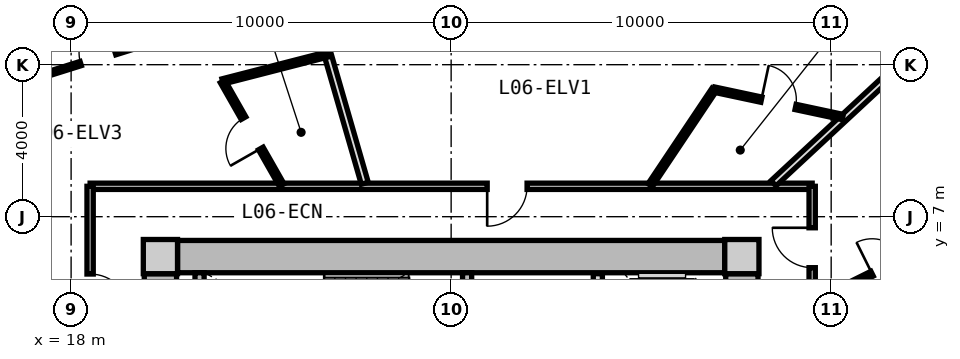
"""IFC4 building model, lengths in metres.
Left out: names, types, materials, properties, quantities, classifications, styles, units other than length and angle.
Written with IfcOpenShell. Run it as: python <this file> out.ifc"""

import sys

from ifc_helpers import new_model, si_unit, direction, frame, frame_2d, origin, origin_2d, place, context, subcontext, project, spatial, rectangle, extrude, source, transform, mapped, element, fill, save


model = new_model("IFC4")
c1 = context("Model", 3, precision=1e-05, world=origin(), true_north=direction((0.0, 1.0)))
c2 = subcontext(c1, "Body", "Model", "MODEL_VIEW")
j1 = project(units=[si_unit("LENGTHUNIT", "METRE"), si_unit("PLANEANGLEUNIT", "RADIAN")], contexts=[c1])
p1 = place(None, origin())
s1 = spatial("IfcSite", under=j1, at=p1, CompositionType="ELEMENT")
p2 = place(p1, origin())
s2 = spatial("IfcBuilding", under=s1, at=p2, CompositionType="ELEMENT")
p3 = place(p2, frame((0.0, 0.0, 24.65)))
s3 = spatial("IfcBuildingStorey", under=s2, at=p3, CompositionType="ELEMENT", Elevation=24.65)
m1 = source(origin(), c2, "Body", "SweptSolid", [
    extrude(rectangle(XDim=0.9, YDim=0.9, at=origin_2d()), origin(), (0.0, 0.0, 1.0), 3.05),
])
for number, where, z_axis, x_axis in (
    (1, (35.65, 5.95, 0.0), (0.0, 0.0, 1.0), (1.0, 0.0, 0.0)),
    (2, (20.35, 5.95, 0.0), (0.0, 0.0, 1.0), (1.0, 0.0, 0.0)),
):
    element("IfcColumn", number, at=place(p3, frame(where, z_axis=z_axis, x_axis=x_axis)), inside=s3, PredefinedType="COLUMN", context=c2, shape_type="MappedRepresentation", body=[
        mapped(m1, transform((0.0, 0.0, 0.0), x_axis=(1.0, 0.0, 0.0), y_axis=(0.0, 1.0, 0.0), z_axis=(0.0, 0.0, 1.0), scale=1.0)),
    ])
m2 = source(origin(), c2, "Body", "SweptSolid", [
    extrude(rectangle(XDim=14.4, YDim=0.85, at=frame_2d((7.2, 0.0))), origin(), (0.0, 0.0, 1.0), 2.79),
])
p4 = place(p3, frame((20.8, 5.95, 0.0), z_axis=(0.0, 0.0, 1.0), x_axis=(1.0, 0.0, 0.0)))
e3 = element("IfcWall", 3, at=p4, inside=s3, PredefinedType="SHEAR", context=c2, shape_type="MappedRepresentation", body=[
    mapped(m2, transform((0.0, 0.0, 0.0), x_axis=(1.0, 0.0, 0.0), y_axis=(0.0, 1.0, 0.0), z_axis=(0.0, 0.0, 1.0), scale=1.0)),
])
m3 = source(origin(), c2, "Body", "SweptSolid", [
    extrude(rectangle(XDim=11.0, YDim=0.85, at=frame_2d((5.5, 0.0))), origin(), (0.0, 0.0, 1.0), 2.79),
])
p5 = place(p3, frame((20.35, -5.5, 0.0), z_axis=(0.0, 0.0, 1.0), x_axis=(0.0, 1.0, 0.0)))
e4 = element("IfcWall", 4, at=p5, inside=s3, PredefinedType="SHEAR", context=c2, shape_type="MappedRepresentation", body=[
    mapped(m3, transform((0.0, 0.0, 0.0), x_axis=(1.0, 0.0, 0.0), y_axis=(0.0, 1.0, 0.0), z_axis=(0.0, 0.0, 1.0), scale=1.0)),
])
p6 = place(p5, frame((3.8, 0.0, 0.0)))
e5 = element("IfcOpeningElement", 5, at=p6, cuts=e4, PredefinedType="OPENING", context=c2, shape_type="SweptSolid", body=[
    extrude(rectangle(XDim=1.2, YDim=2.15, at=frame_2d((0.6, 1.075))), frame((0.0, 0.435, 0.0), z_axis=(0.0, -1.0, 0.0), x_axis=(1.0, 0.0, 0.0)), (0.0, 0.0, 1.0), 0.87),
])
p7 = place(p3, frame((35.65, 5.5, 0.0), z_axis=(0.0, 0.0, 1.0), x_axis=(0.0, -1.0, 0.0)))
e6 = element("IfcWall", 6, at=p7, inside=s3, PredefinedType="SHEAR", context=c2, shape_type="MappedRepresentation", body=[
    mapped(m3, transform((0.0, 0.0, 0.0), x_axis=(1.0, 0.0, 0.0), y_axis=(0.0, 1.0, 0.0), z_axis=(0.0, 0.0, 1.0), scale=1.0)),
])
p8 = place(p7, frame((5.65, 0.0, 0.0)))
e7 = element("IfcOpeningElement", 7, at=p8, cuts=e6, PredefinedType="OPENING", context=c2, shape_type="SweptSolid", body=[
    extrude(rectangle(XDim=1.2, YDim=2.15, at=frame_2d((0.6, 1.075))), frame((0.0, 0.435, 0.0), z_axis=(0.0, -1.0, 0.0), x_axis=(1.0, 0.0, 0.0)), (0.0, 0.0, 1.0), 0.87),
])
m4 = source(origin(), c2, "Body", "SweptSolid", [
    extrude(rectangle(XDim=3.075, YDim=0.24, at=frame_2d((1.538, 0.0))), origin(), (0.0, 0.0, 1.0), 2.79),
])
p9 = place(p3, frame((21.38, 2.45, 0.0), z_axis=(0.0, 0.0, 1.0), x_axis=(0.0, 1.0, 0.0)))
e8 = element("IfcWall", 8, at=p9, inside=s3, PredefinedType="PARTITIONING", context=c2, shape_type="MappedRepresentation", body=[
    mapped(m4, transform((0.0, 0.0, 0.0), x_axis=(1.0, 0.0, 0.0), y_axis=(0.0, 1.0, 0.0), z_axis=(0.0, 0.0, 1.0), scale=1.0)),
])
p10 = place(p3, frame((28.42, 2.45, 0.0), z_axis=(0.0, 0.0, 1.0), x_axis=(0.0, 1.0, 0.0)))
e9 = element("IfcWall", 9, at=p10, inside=s3, PredefinedType="PARTITIONING", context=c2, shape_type="MappedRepresentation", body=[
    mapped(m4, transform((0.0, 0.0, 0.0), x_axis=(1.0, 0.0, 0.0), y_axis=(0.0, 1.0, 0.0), z_axis=(0.0, 0.0, 1.0), scale=1.0)),
])
p11 = place(p10, frame((0.55, 0.0, 0.0)))
e10 = element("IfcOpeningElement", 10, at=p11, cuts=e9, PredefinedType="OPENING", context=c2, shape_type="SweptSolid", body=[
    extrude(rectangle(XDim=1.1, YDim=2.15, at=frame_2d((0.55, 1.075))), frame((0.0, 0.13, 0.0), z_axis=(0.0, -1.0, 0.0), x_axis=(1.0, 0.0, 0.0)), (0.0, 0.0, 1.0), 0.26),
])
m5 = source(origin(), c2, "Body", "SweptSolid", [
    extrude(rectangle(XDim=5.0, YDim=0.24, at=frame_2d((2.5, 0.0))), origin(), (0.0, 0.0, 1.0), 2.775),
])
p12 = place(p3, frame((31.86, 0.5, 0.0), z_axis=(0.0, 0.0, 1.0), x_axis=(0.0, 1.0, 0.0)))
e11 = element("IfcWall", 11, at=p12, inside=s3, PredefinedType="PARTITIONING", context=c2, shape_type="MappedRepresentation", body=[
    mapped(m5, transform((0.0, 0.0, 0.0), x_axis=(1.0, 0.0, 0.0), y_axis=(0.0, 1.0, 0.0), z_axis=(0.0, 0.0, 1.0), scale=1.0)),
])
p13 = place(p12, frame((3.05, 0.0, 0.0)))
e12 = element("IfcOpeningElement", 12, at=p13, cuts=e11, PredefinedType="OPENING", context=c2, shape_type="SweptSolid", body=[
    extrude(rectangle(XDim=1.3, YDim=2.2, at=frame_2d((0.65, 1.1))), frame((0.0, 0.13, 0.0), z_axis=(0.0, -1.0, 0.0), x_axis=(1.0, 0.0, 0.0)), (0.0, 0.0, 1.0), 0.26),
])
p14 = place(p12, frame((0.55, 0.0, 0.0)))
e13 = element("IfcOpeningElement", 13, at=p14, cuts=e11, PredefinedType="OPENING", context=c2, shape_type="SweptSolid", body=[
    extrude(rectangle(XDim=1.3, YDim=2.2, at=frame_2d((0.65, 1.1))), frame((0.0, 0.13, 0.0), z_axis=(0.0, -1.0, 0.0), x_axis=(1.0, 0.0, 0.0)), (0.0, 0.0, 1.0), 0.26),
])
m6 = source(origin(), c2, "Body", "SweptSolid", [
    extrude(rectangle(XDim=19.0, YDim=0.165, at=frame_2d((9.5, 0.0))), origin(), (0.0, 0.0, 1.0), 2.775),
])
p15 = place(p3, frame((18.5, 7.8, 0.0), z_axis=(0.0, 0.0, 1.0), x_axis=(1.0, 0.0, 0.0)))
e14 = element("IfcWall", 14, at=p15, inside=s3, PredefinedType="PARTITIONING", context=c2, shape_type="MappedRepresentation", body=[
    mapped(m6, transform((0.0, 0.0, 0.0), x_axis=(1.0, 0.0, 0.0), y_axis=(0.0, 1.0, 0.0), z_axis=(0.0, 0.0, 1.0), scale=1.0)),
])
p16 = place(p15, frame((10.448, 0.0, 0.0)))
e15 = element("IfcOpeningElement", 15, at=p16, cuts=e14, PredefinedType="OPENING", context=c2, shape_type="SweptSolid", body=[
    extrude(rectangle(XDim=1.05, YDim=2.15, at=frame_2d((0.525, 1.075))), frame((0.0, 0.093, 0.0), z_axis=(0.0, -1.0, 0.0), x_axis=(1.0, 0.0, 0.0)), (0.0, 0.0, 1.0), 0.185),
])
m7 = source(origin(), c2, "Body", "SweptSolid", [
    extrude(rectangle(XDim=15.6, YDim=0.165, at=frame_2d((7.8, 0.0))), origin(), (0.0, 0.0, 1.0), 2.775),
])
p17 = place(p3, frame((18.5, -7.8, 0.0), z_axis=(0.0, 0.0, 1.0), x_axis=(0.0, 1.0, 0.0)))
e16 = element("IfcWall", 16, at=p17, inside=s3, PredefinedType="PARTITIONING", context=c2, shape_type="MappedRepresentation", body=[
    mapped(m7, transform((0.0, 0.0, 0.0), x_axis=(1.0, 0.0, 0.0), y_axis=(0.0, 1.0, 0.0), z_axis=(0.0, 0.0, 1.0), scale=1.0)),
])
p18 = place(p17, frame((12.241, 0.0, 0.0)))
e17 = element("IfcOpeningElement", 17, at=p18, cuts=e16, PredefinedType="OPENING", context=c2, shape_type="SweptSolid", body=[
    extrude(rectangle(XDim=1.05, YDim=2.15, at=frame_2d((0.525, 1.075))), frame((0.0, 0.093, 0.0), z_axis=(0.0, -1.0, 0.0), x_axis=(1.0, 0.0, 0.0)), (0.0, 0.0, 1.0), 0.185),
])
p19 = place(p17, frame((3.63, 0.0, 0.0)))
e18 = element("IfcOpeningElement", 18, at=p19, cuts=e16, PredefinedType="OPENING", context=c2, shape_type="SweptSolid", body=[
    extrude(rectangle(XDim=1.05, YDim=2.15, at=frame_2d((0.525, 1.075))), frame((0.0, 0.093, 0.0), z_axis=(0.0, -1.0, 0.0), x_axis=(1.0, 0.0, 0.0)), (0.0, 0.0, 1.0), 0.185),
])
p20 = place(p3, frame((37.5, 7.8, 0.0), z_axis=(0.0, 0.0, 1.0), x_axis=(0.0, -1.0, 0.0)))
e19 = element("IfcWall", 19, at=p20, inside=s3, PredefinedType="PARTITIONING", context=c2, shape_type="MappedRepresentation", body=[
    mapped(m7, transform((0.0, 0.0, 0.0), x_axis=(1.0, 0.0, 0.0), y_axis=(0.0, 1.0, 0.0), z_axis=(0.0, 0.0, 1.0), scale=1.0)),
])
p21 = place(p20, frame((12.141, 0.0, 0.0)))
e20 = element("IfcOpeningElement", 20, at=p21, cuts=e19, PredefinedType="OPENING", context=c2, shape_type="SweptSolid", body=[
    extrude(rectangle(XDim=1.25, YDim=2.2, at=frame_2d((0.625, 1.1))), frame((0.0, 0.093, 0.0), z_axis=(0.0, -1.0, 0.0), x_axis=(1.0, 0.0, 0.0)), (0.0, 0.0, 1.0), 0.185),
])
p22 = place(p20, frame((6.196, 0.0, 0.0)))
e21 = element("IfcOpeningElement", 21, at=p22, cuts=e19, PredefinedType="OPENING", context=c2, shape_type="SweptSolid", body=[
    extrude(rectangle(XDim=1.05, YDim=2.15, at=frame_2d((0.525, 1.075))), frame((0.0, 0.093, 0.0), z_axis=(0.0, -1.0, 0.0), x_axis=(1.0, 0.0, 0.0)), (0.0, 0.0, 1.0), 0.185),
])
p23 = place(p20, frame((1.092, 0.0, 0.0)))
e22 = element("IfcOpeningElement", 22, at=p23, cuts=e19, PredefinedType="OPENING", context=c2, shape_type="SweptSolid", body=[
    extrude(rectangle(XDim=1.05, YDim=2.15, at=frame_2d((0.525, 1.075))), frame((0.0, 0.093, 0.0), z_axis=(0.0, -1.0, 0.0), x_axis=(1.0, 0.0, 0.0)), (0.0, 0.0, 1.0), 0.185),
])
m8 = source(origin(), c2, "Body", "SweptSolid", [
    extrude(rectangle(XDim=7.435, YDim=0.19, at=frame_2d((3.717, 0.0))), origin(), (0.0, 0.0, 1.0), 2.225),
])
p24 = place(p3, frame((36.483, 7.88, 0.0), z_axis=(0.0, 0.0, 1.0), x_axis=(0.732651956848, 0.680603489652, 0.0)))
e23 = element("IfcWall", 23, at=p24, inside=s3, PredefinedType="PARTITIONING", context=c2, shape_type="MappedRepresentation", body=[
    mapped(m8, transform((0.0, 0.0, 0.0), x_axis=(1.0, 0.0, 0.0), y_axis=(0.0, 1.0, 0.0), z_axis=(0.0, 0.0, 1.0), scale=1.0)),
])
m9 = source(origin(), c2, "Body", "SweptSolid", [
    extrude(rectangle(XDim=10.196, YDim=0.19, at=frame_2d((5.098, 0.0))), origin(), (0.0, 0.0, 1.0), 2.225),
])
p25 = place(p3, frame((25.727, 7.88, 0.0), z_axis=(0.0, 0.0, 1.0), x_axis=(-0.277136420347, 0.960830580549, 0.0)))
e24 = element("IfcWall", 24, at=p25, inside=s3, PredefinedType="PARTITIONING", context=c2, shape_type="MappedRepresentation", body=[
    mapped(m9, transform((0.0, 0.0, 0.0), x_axis=(1.0, 0.0, 0.0), y_axis=(0.0, 1.0, 0.0), z_axis=(0.0, 0.0, 1.0), scale=1.0)),
])
m10 = source(origin(), c2, "Body", "SweptSolid", [
    extrude(rectangle(XDim=3.025, YDim=0.14, at=frame_2d((1.513, 0.0))), origin(), (0.0, 0.0, 1.0), 2.775),
])
p26 = place(p3, frame((33.24, 7.83, 0.0), z_axis=(0.0, 0.0, 1.0), x_axis=(0.556189165904, 0.831055721195, 0.0)))
e25 = element("IfcWall", 25, at=p26, inside=s3, PredefinedType="PARTITIONING", context=c2, shape_type="MappedRepresentation", body=[
    mapped(m10, transform((0.0, 0.0, 0.0), x_axis=(1.0, 0.0, 0.0), y_axis=(0.0, 1.0, 0.0), z_axis=(0.0, 0.0, 1.0), scale=1.0)),
])
m11 = source(origin(), c2, "Body", "SweptSolid", [
    extrude(rectangle(XDim=3.459, YDim=0.14, at=frame_2d((1.729, 0.0))), origin(), (0.0, 0.0, 1.0), 2.775),
])
p27 = place(p3, frame((34.922, 10.344, 0.0), z_axis=(0.0, 0.0, 1.0), x_axis=(0.978006468578, -0.208574560815, 0.0)))
e26 = element("IfcWall", 26, at=p27, inside=s3, PredefinedType="PARTITIONING", context=c2, shape_type="MappedRepresentation", body=[
    mapped(m11, transform((0.0, 0.0, 0.0), x_axis=(1.0, 0.0, 0.0), y_axis=(0.0, 1.0, 0.0), z_axis=(0.0, 0.0, 1.0), scale=1.0)),
])
p28 = place(p27, frame((1.27, 0.0, 0.0)))
e27 = element("IfcOpeningElement", 27, at=p28, cuts=e26, PredefinedType="OPENING", context=c2, shape_type="SweptSolid", body=[
    extrude(rectangle(XDim=0.92, YDim=2.1, at=frame_2d((0.46, 1.05))), frame((0.0, 0.08, 0.0), z_axis=(0.0, -1.0, 0.0), x_axis=(1.0, 0.0, 0.0)), (0.0, 0.0, 1.0), 0.16),
])
m12 = source(origin(), c2, "Body", "SweptSolid", [
    extrude(rectangle(XDim=3.141, YDim=0.14, at=frame_2d((1.571, 0.0))), origin(), (0.0, 0.0, 1.0), 2.775),
])
p29 = place(p3, frame((23.542, 7.83, 0.0), z_axis=(0.0, 0.0, 1.0), x_axis=(-0.494874486088, 0.868964465913, 0.0)))
e28 = element("IfcWall", 28, at=p29, inside=s3, PredefinedType="PARTITIONING", context=c2, shape_type="MappedRepresentation", body=[
    mapped(m12, transform((0.0, 0.0, 0.0), x_axis=(1.0, 0.0, 0.0), y_axis=(0.0, 1.0, 0.0), z_axis=(0.0, 0.0, 1.0), scale=1.0)),
])
p30 = place(p29, frame((1.111, 0.0, 0.0)))
e29 = element("IfcOpeningElement", 29, at=p30, cuts=e28, PredefinedType="OPENING", context=c2, shape_type="SweptSolid", body=[
    extrude(rectangle(XDim=0.92, YDim=2.1, at=frame_2d((0.46, 1.05))), frame((0.0, 0.08, 0.0), z_axis=(0.0, -1.0, 0.0), x_axis=(1.0, 0.0, 0.0)), (0.0, 0.0, 1.0), 0.16),
])
m13 = source(origin(), c2, "Body", "SweptSolid", [
    extrude(rectangle(XDim=2.868, YDim=0.14, at=frame_2d((1.434, 0.0))), origin(), (0.0, 0.0, 1.0), 2.775),
])
p31 = place(p3, frame((21.987, 10.56, 0.0), z_axis=(0.0, 0.0, 1.0), x_axis=(0.968467705195, 0.249139125778, 0.0)))
e30 = element("IfcWall", 30, at=p31, inside=s3, PredefinedType="PARTITIONING", context=c2, shape_type="MappedRepresentation", body=[
    mapped(m13, transform((0.0, 0.0, 0.0), x_axis=(1.0, 0.0, 0.0), y_axis=(0.0, 1.0, 0.0), z_axis=(0.0, 0.0, 1.0), scale=1.0)),
])
m14 = source(origin(), c2, "Body", "SweptSolid", [
    extrude(rectangle(XDim=4.189, YDim=0.115, at=frame_2d((2.094, 0.0))), origin(), (0.0, 0.0, 1.0), 2.775),
])
p32 = place(p3, frame((20.704, 11.801, 0.0), z_axis=(0.0, 0.0, 1.0), x_axis=(-0.954002766053, -0.299797802467, 0.0)))
e31 = element("IfcWall", 31, at=p32, inside=s3, PredefinedType="PARTITIONING", context=c2, shape_type="MappedRepresentation", body=[
    mapped(m14, transform((0.0, 0.0, 0.0), x_axis=(1.0, 0.0, 0.0), y_axis=(0.0, 1.0, 0.0), z_axis=(0.0, 0.0, 1.0), scale=1.0)),
])
p33 = place(p32, frame((1.619, 0.0, 0.0)))
e32 = element("IfcOpeningElement", 32, at=p33, cuts=e31, PredefinedType="OPENING", context=c2, shape_type="SweptSolid", body=[
    extrude(rectangle(XDim=0.95, YDim=2.1, at=frame_2d((0.475, 1.05))), frame((0.0, 0.067, 0.0), z_axis=(0.0, -1.0, 0.0), x_axis=(1.0, 0.0, 0.0)), (0.0, 0.0, 1.0), 0.135),
])
m15 = source(origin(), c2, "Body", "SweptSolid", [
    extrude(rectangle(XDim=4.374, YDim=0.14, at=frame_2d((2.187, 0.0))), origin(), (0.0, 0.0, 1.0), 2.775),
])
p34 = place(p3, frame((37.53, 4.732, 0.0), z_axis=(0.0, 0.0, 1.0), x_axis=(0.89568523908, 0.444688601714, 0.0)))
e33 = element("IfcWall", 33, at=p34, inside=s3, PredefinedType="PARTITIONING", context=c2, shape_type="MappedRepresentation", body=[
    mapped(m15, transform((0.0, 0.0, 0.0), x_axis=(1.0, 0.0, 0.0), y_axis=(0.0, 1.0, 0.0), z_axis=(0.0, 0.0, 1.0), scale=1.0)),
])
p35 = place(p34, frame((1.727, 0.0, 0.0)))
e34 = element("IfcOpeningElement", 34, at=p35, cuts=e33, PredefinedType="OPENING", context=c2, shape_type="SweptSolid", body=[
    extrude(rectangle(XDim=0.92, YDim=2.1, at=frame_2d((0.46, 1.05))), frame((0.0, 0.08, 0.0), z_axis=(0.0, -1.0, 0.0), x_axis=(1.0, 0.0, 0.0)), (0.0, 0.0, 1.0), 0.16),
])
m16 = source(origin(), c2, "Body", "SweptSolid", [
    extrude(rectangle(XDim=1.05, YDim=2.15, at=frame_2d((0.525, 1.075))), frame((0.0, 0.025, 0.0), z_axis=(0.0, -1.0, 0.0), x_axis=(1.0, 0.0, 0.0)), (0.0, 0.0, 1.0), 0.05),
])
p36 = place(p16, frame((1.05, 0.0, 0.0), z_axis=(0.0, 0.0, 1.0), x_axis=(-1.0, 0.0, 0.0)))
e35 = element("IfcDoor", 35, at=p36, inside=s3, OperationType="SINGLE_SWING_RIGHT", PredefinedType="DOOR", context=c2, shape_type="MappedRepresentation", body=[
    mapped(m16, transform((0.0, 0.0, 0.0), x_axis=(1.0, 0.0, 0.0), y_axis=(0.0, 1.0, 0.0), z_axis=(0.0, 0.0, 1.0), scale=1.0)),
])
fill(e15, e35)
m17 = source(origin(), c2, "Body", "SweptSolid", [
    extrude(rectangle(XDim=0.92, YDim=2.1, at=frame_2d((0.46, 1.05))), frame((0.0, 0.025, 0.0), z_axis=(0.0, -1.0, 0.0), x_axis=(1.0, 0.0, 0.0)), (0.0, 0.0, 1.0), 0.05),
])
p37 = place(p28, origin())
e36 = element("IfcDoor", 36, at=p37, inside=s3, OperationType="SINGLE_SWING_LEFT", PredefinedType="DOOR", context=c2, shape_type="MappedRepresentation", body=[
    mapped(m17, transform((0.0, 0.0, 0.0), x_axis=(1.0, 0.0, 0.0), y_axis=(0.0, 1.0, 0.0), z_axis=(0.0, 0.0, 1.0), scale=1.0)),
])
fill(e27, e36)
p38 = place(p18, frame((1.05, 0.0, 0.0), z_axis=(0.0, 0.0, 1.0), x_axis=(-1.0, 0.0, 0.0)))
e37 = element("IfcDoor", 37, at=p38, inside=s3, OperationType="SINGLE_SWING_RIGHT", PredefinedType="DOOR", context=c2, shape_type="MappedRepresentation", body=[
    mapped(m16, transform((0.0, 0.0, 0.0), x_axis=(1.0, 0.0, 0.0), y_axis=(0.0, 1.0, 0.0), z_axis=(0.0, 0.0, 1.0), scale=1.0)),
])
fill(e17, e37)
p39 = place(p30, origin())
e38 = element("IfcDoor", 38, at=p39, inside=s3, OperationType="SINGLE_SWING_LEFT", PredefinedType="DOOR", context=c2, shape_type="MappedRepresentation", body=[
    mapped(m17, transform((0.0, 0.0, 0.0), x_axis=(1.0, 0.0, 0.0), y_axis=(0.0, 1.0, 0.0), z_axis=(0.0, 0.0, 1.0), scale=1.0)),
])
fill(e29, e38)
m18 = source(origin(), c2, "Body", "SweptSolid", [
    extrude(rectangle(XDim=0.95, YDim=2.1, at=frame_2d((0.475, 1.05))), frame((0.0, 0.025, 0.0), z_axis=(0.0, -1.0, 0.0), x_axis=(1.0, 0.0, 0.0)), (0.0, 0.0, 1.0), 0.05),
])
p40 = place(p33, frame((0.95, 0.0, 0.0), z_axis=(0.0, 0.0, 1.0), x_axis=(-1.0, 0.0, 0.0)))
e39 = element("IfcDoor", 39, at=p40, inside=s3, OperationType="SINGLE_SWING_RIGHT", PredefinedType="DOOR", context=c2, shape_type="MappedRepresentation", body=[
    mapped(m18, transform((0.0, 0.0, 0.0), x_axis=(1.0, 0.0, 0.0), y_axis=(0.0, 1.0, 0.0), z_axis=(0.0, 0.0, 1.0), scale=1.0)),
])
fill(e32, e39)
p41 = place(p23, frame((1.05, 0.0, 0.0), z_axis=(0.0, 0.0, 1.0), x_axis=(-1.0, 0.0, 0.0)))
e40 = element("IfcDoor", 40, at=p41, inside=s3, OperationType="SINGLE_SWING_RIGHT", PredefinedType="DOOR", context=c2, shape_type="MappedRepresentation", body=[
    mapped(m16, transform((0.0, 0.0, 0.0), x_axis=(1.0, 0.0, 0.0), y_axis=(0.0, 1.0, 0.0), z_axis=(0.0, 0.0, 1.0), scale=1.0)),
])
fill(e22, e40)
p42 = place(p35, origin())
e41 = element("IfcDoor", 41, at=p42, inside=s3, OperationType="SINGLE_SWING_LEFT", PredefinedType="DOOR", context=c2, shape_type="MappedRepresentation", body=[
    mapped(m17, transform((0.0, 0.0, 0.0), x_axis=(1.0, 0.0, 0.0), y_axis=(0.0, 1.0, 0.0), z_axis=(0.0, 0.0, 1.0), scale=1.0)),
])
fill(e34, e41)
save(model, sys.argv[1])
